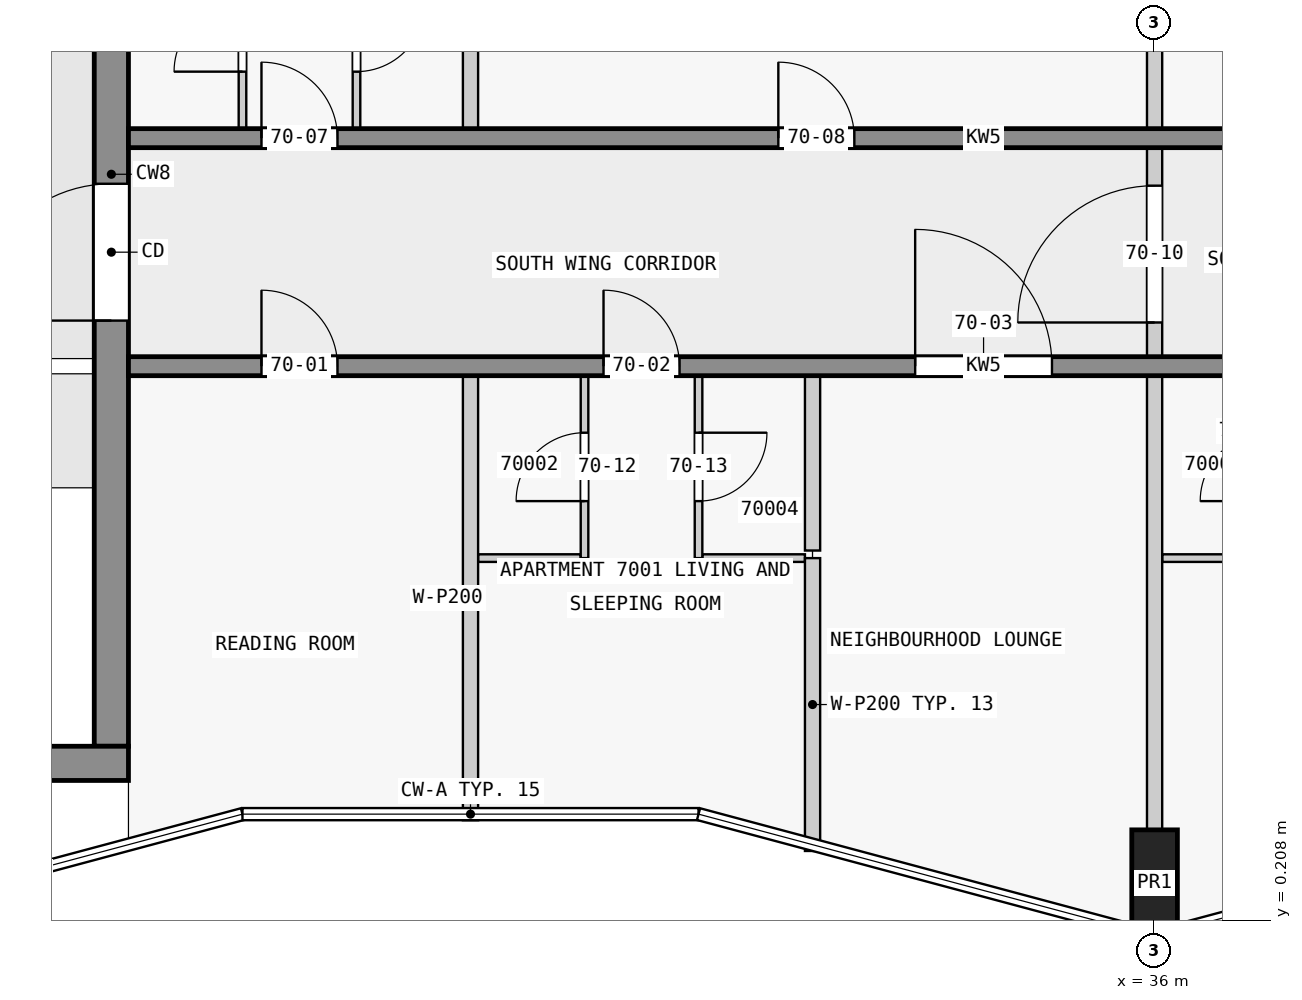
"""IFC4 building model, lengths in metres.
Left out: names, types, materials, properties, quantities, classifications, styles, units other than length and angle.
Written with IfcOpenShell. Run it as: python <this file> out.ifc"""

import sys

from ifc_helpers import new_model, si_unit, direction, frame, frame_2d, origin, origin_2d, place, context, subcontext, project, spatial, rectangle, extrude, element, fill, save


model = new_model("IFC4")
c1 = context("Model", 3, precision=1e-05, world=origin(), true_north=direction((0.0, 1.0)))
c2 = subcontext(c1, "Body", "Model", "MODEL_VIEW")
j1 = project(units=[si_unit("LENGTHUNIT", "METRE"), si_unit("PLANEANGLEUNIT", "RADIAN")], contexts=[c1])
p1 = place(None, origin())
s1 = spatial("IfcSite", under=j1, at=p1, CompositionType="ELEMENT")
p2 = place(p1, origin())
s2 = spatial("IfcBuilding", under=s1, at=p2, CompositionType="ELEMENT")
p3 = place(p2, frame((0.0, 0.0, 266.9)))
s3 = spatial("IfcBuildingStorey", under=s2, at=p3, CompositionType="ELEMENT", Elevation=266.9)
p4 = place(p3, frame((36.0, 0.7, 0.0), z_axis=(0.0, 0.0, 1.0), x_axis=(1.0, 0.0, 0.0)))
e1 = element("IfcColumn", 1, at=p4, inside=s3, PredefinedType="COLUMN", context=c2, shape_type="SweptSolid", body=[
    extrude(rectangle(XDim=0.6, YDim=1.4, at=origin_2d()), origin(), (0.0, 0.0, 1.0), 3.5),
])
p5 = place(p3, frame((1.85, 2.275, 0.0), z_axis=(0.0, 0.0, 1.0), x_axis=(1.0, 0.0, 0.0)))
e2 = element("IfcWall", 2, at=p5, inside=s3, PredefinedType="SHEAR", context=c2, shape_type="SweptSolid", body=[
    extrude(rectangle(XDim=20.65, YDim=0.45, at=frame_2d((10.325, 0.0))), origin(), (0.0, 0.0, 1.0), 3.25),
])
p6 = place(p3, frame((22.275, 2.5, 0.0), z_axis=(0.0, 0.0, 1.0), x_axis=(0.0, 1.0, 0.0)))
e3 = element("IfcWall", 3, at=p6, inside=s3, PredefinedType="SHEAR", context=c2, shape_type="SweptSolid", body=[
    extrude(rectangle(XDim=15.05, YDim=0.45, at=frame_2d((7.525, 0.0))), origin(), (0.0, 0.0, 1.0), 3.25),
])
p7 = place(p6, frame((5.6, 0.0, 0.0)))
e4 = element("IfcOpeningElement", 4, at=p7, cuts=e3, PredefinedType="OPENING", context=c2, shape_type="SweptSolid", body=[
    extrude(rectangle(XDim=1.8, YDim=2.1, at=frame_2d((0.9, 1.05))), frame((0.0, 0.235, 0.0), z_axis=(0.0, -1.0, 0.0), x_axis=(1.0, 0.0, 0.0)), (0.0, 0.0, 1.0), 0.47),
])
p8 = place(p3, frame((22.5, 7.5, 0.0), z_axis=(0.0, 0.0, 1.0), x_axis=(1.0, 0.0, 0.0)))
e5 = element("IfcWall", 5, at=p8, inside=s3, PredefinedType="SHEAR", context=c2, shape_type="SweptSolid", body=[
    extrude(rectangle(XDim=22.5, YDim=0.25, at=frame_2d((11.25, 0.0))), origin(), (0.0, 0.0, 1.0), 3.25),
])
p9 = place(p8, frame((1.75, 0.0, 0.0)))
e6 = element("IfcOpeningElement", 6, at=p9, cuts=e5, PredefinedType="OPENING", context=c2, shape_type="SweptSolid", body=[
    extrude(rectangle(XDim=1.0, YDim=2.1, at=frame_2d((0.5, 1.05))), frame((0.0, 0.135, 0.0), z_axis=(0.0, -1.0, 0.0), x_axis=(1.0, 0.0, 0.0)), (0.0, 0.0, 1.0), 0.27),
])
p10 = place(p8, frame((6.25, 0.0, 0.0)))
e7 = element("IfcOpeningElement", 7, at=p10, cuts=e5, PredefinedType="OPENING", context=c2, shape_type="SweptSolid", body=[
    extrude(rectangle(XDim=1.0, YDim=2.1, at=frame_2d((0.5, 1.05))), frame((0.0, 0.135, 0.0), z_axis=(0.0, -1.0, 0.0), x_axis=(1.0, 0.0, 0.0)), (0.0, 0.0, 1.0), 0.27),
])
p11 = place(p8, frame((10.35, 0.0, 0.0)))
e8 = element("IfcOpeningElement", 8, at=p11, cuts=e5, PredefinedType="OPENING", context=c2, shape_type="SweptSolid", body=[
    extrude(rectangle(XDim=1.8, YDim=2.1, at=frame_2d((0.9, 1.05))), frame((0.0, 0.135, 0.0), z_axis=(0.0, -1.0, 0.0), x_axis=(1.0, 0.0, 0.0)), (0.0, 0.0, 1.0), 0.27),
])
p12 = place(p8, frame((15.25, 0.0, 0.0)))
e9 = element("IfcOpeningElement", 9, at=p12, cuts=e5, PredefinedType="OPENING", context=c2, shape_type="SweptSolid", body=[
    extrude(rectangle(XDim=1.0, YDim=2.1, at=frame_2d((0.5, 1.05))), frame((0.0, 0.135, 0.0), z_axis=(0.0, -1.0, 0.0), x_axis=(1.0, 0.0, 0.0)), (0.0, 0.0, 1.0), 0.27),
])
p13 = place(p8, frame((18.75, 0.0, 0.0)))
e10 = element("IfcOpeningElement", 10, at=p13, cuts=e5, PredefinedType="OPENING", context=c2, shape_type="SweptSolid", body=[
    extrude(rectangle(XDim=0.9, YDim=2.1, at=frame_2d((0.45, 1.05))), frame((0.0, 0.135, 0.0), z_axis=(0.0, -1.0, 0.0), x_axis=(1.0, 0.0, 0.0)), (0.0, 0.0, 1.0), 0.27),
])
p14 = place(p8, frame((20.95, 0.0, 0.0)))
e11 = element("IfcOpeningElement", 11, at=p14, cuts=e5, PredefinedType="OPENING", context=c2, shape_type="SweptSolid", body=[
    extrude(rectangle(XDim=1.0, YDim=2.1, at=frame_2d((0.5, 1.05))), frame((0.0, 0.135, 0.0), z_axis=(0.0, -1.0, 0.0), x_axis=(1.0, 0.0, 0.0)), (0.0, 0.0, 1.0), 0.27),
])
p15 = place(p3, frame((22.5, 10.5, 0.0), z_axis=(0.0, 0.0, 1.0), x_axis=(1.0, 0.0, 0.0)))
e12 = element("IfcWall", 12, at=p15, inside=s3, PredefinedType="SHEAR", context=c2, shape_type="SweptSolid", body=[
    extrude(rectangle(XDim=22.5, YDim=0.25, at=frame_2d((11.25, 0.0))), origin(), (0.0, 0.0, 1.0), 3.25),
])
p16 = place(p15, frame((1.75, 0.0, 0.0)))
e13 = element("IfcOpeningElement", 13, at=p16, cuts=e12, PredefinedType="OPENING", context=c2, shape_type="SweptSolid", body=[
    extrude(rectangle(XDim=1.0, YDim=2.1, at=frame_2d((0.5, 1.05))), frame((0.0, 0.135, 0.0), z_axis=(0.0, -1.0, 0.0), x_axis=(1.0, 0.0, 0.0)), (0.0, 0.0, 1.0), 0.27),
])
p17 = place(p15, frame((8.55, 0.0, 0.0)))
e14 = element("IfcOpeningElement", 14, at=p17, cuts=e12, PredefinedType="OPENING", context=c2, shape_type="SweptSolid", body=[
    extrude(rectangle(XDim=1.0, YDim=2.1, at=frame_2d((0.5, 1.05))), frame((0.0, 0.135, 0.0), z_axis=(0.0, -1.0, 0.0), x_axis=(1.0, 0.0, 0.0)), (0.0, 0.0, 1.0), 0.27),
])
p18 = place(p15, frame((16.85, 0.0, 0.0)))
e15 = element("IfcOpeningElement", 15, at=p18, cuts=e12, PredefinedType="OPENING", context=c2, shape_type="SweptSolid", body=[
    extrude(rectangle(XDim=1.0, YDim=2.1, at=frame_2d((0.5, 1.05))), frame((0.0, 0.135, 0.0), z_axis=(0.0, -1.0, 0.0), x_axis=(1.0, 0.0, 0.0)), (0.0, 0.0, 1.0), 0.27),
])
for number, where, z_axis, x_axis in (
    (16, (27.1, 4.975, 0.0), (0.0, 0.0, 1.0), (1.0, 0.0, 0.0)),
    (17, (30.05, 4.975, 0.0), (0.0, 0.0, 1.0), (1.0, 0.0, 0.0)),
    (18, (36.1, 4.975, 0.0), (0.0, 0.0, 1.0), (1.0, 0.0, 0.0)),
):
    element("IfcWall", number, at=place(p3, frame(where, z_axis=z_axis, x_axis=x_axis)), inside=s3, PredefinedType="PARTITIONING", context=c2, shape_type="SweptSolid", body=[
        extrude(rectangle(XDim=1.35, YDim=0.1, at=frame_2d((0.675, 0.0))), origin(), (0.0, 0.0, 1.0), 3.25),
    ])
p19 = place(p3, frame((24.0, 10.625, 0.0), z_axis=(0.0, 0.0, 1.0), x_axis=(0.0, 1.0, 0.0)))
e19 = element("IfcWall", 19, at=p19, inside=s3, PredefinedType="PARTITIONING", context=c2, shape_type="SweptSolid", body=[
    extrude(rectangle(XDim=2.4, YDim=0.1, at=frame_2d((1.2, 0.0))), origin(), (0.0, 0.0, 1.0), 3.25),
])
p20 = place(p19, frame((0.75, 0.0, 0.0)))
e20 = element("IfcOpeningElement", 20, at=p20, cuts=e19, PredefinedType="OPENING", context=c2, shape_type="SweptSolid", body=[
    extrude(rectangle(XDim=0.9, YDim=2.1, at=frame_2d((0.45, 1.05))), frame((0.0, 0.06, 0.0), z_axis=(0.0, -1.0, 0.0), x_axis=(1.0, 0.0, 0.0)), (0.0, 0.0, 1.0), 0.12),
])
p21 = place(p3, frame((25.5, 13.025, 0.0), z_axis=(0.0, 0.0, 1.0), x_axis=(0.0, -1.0, 0.0)))
e21 = element("IfcWall", 21, at=p21, inside=s3, PredefinedType="PARTITIONING", context=c2, shape_type="SweptSolid", body=[
    extrude(rectangle(XDim=2.4, YDim=0.1, at=frame_2d((1.2, 0.0))), origin(), (0.0, 0.0, 1.0), 3.25),
])
p22 = place(p21, frame((0.75, 0.0, 0.0)))
e22 = element("IfcOpeningElement", 22, at=p22, cuts=e21, PredefinedType="OPENING", context=c2, shape_type="SweptSolid", body=[
    extrude(rectangle(XDim=0.9, YDim=2.1, at=frame_2d((0.45, 1.05))), frame((0.0, 0.06, 0.0), z_axis=(0.0, -1.0, 0.0), x_axis=(1.0, 0.0, 0.0)), (0.0, 0.0, 1.0), 0.12),
])
p23 = place(p3, frame((27.0, 1.527, 0.0), z_axis=(0.0, 0.0, 1.0), x_axis=(0.0, 1.0, 0.0)))
e23 = element("IfcWall", 23, at=p23, inside=s3, PredefinedType="PARTITIONING", context=c2, shape_type="SweptSolid", body=[
    extrude(rectangle(XDim=5.848, YDim=0.2, at=frame_2d((2.924, 0.0))), origin(), (0.0, 0.0, 1.0), 3.25),
])
p24 = place(p3, frame((27.0, 10.625, 0.0), z_axis=(0.0, 0.0, 1.0), x_axis=(0.0, 1.0, 0.0)))
e24 = element("IfcWall", 24, at=p24, inside=s3, PredefinedType="PARTITIONING", context=c2, shape_type="SweptSolid", body=[
    extrude(rectangle(XDim=2.3, YDim=0.2, at=frame_2d((1.15, 0.0))), origin(), (0.0, 0.0, 1.0), 3.25),
])
p25 = place(p3, frame((28.5, 4.975, 0.0), z_axis=(0.0, 0.0, 1.0), x_axis=(0.0, 1.0, 0.0)))
e25 = element("IfcWall", 25, at=p25, inside=s3, PredefinedType="PARTITIONING", context=c2, shape_type="SweptSolid", body=[
    extrude(rectangle(XDim=2.4, YDim=0.1, at=frame_2d((1.2, 0.0))), origin(), (0.0, 0.0, 1.0), 3.25),
])
p26 = place(p25, frame((0.75, 0.0, 0.0)))
e26 = element("IfcOpeningElement", 26, at=p26, cuts=e25, PredefinedType="OPENING", context=c2, shape_type="SweptSolid", body=[
    extrude(rectangle(XDim=0.9, YDim=2.1, at=frame_2d((0.45, 1.05))), frame((0.0, 0.06, 0.0), z_axis=(0.0, -1.0, 0.0), x_axis=(1.0, 0.0, 0.0)), (0.0, 0.0, 1.0), 0.12),
])
p27 = place(p3, frame((30.0, 7.375, 0.0), z_axis=(0.0, 0.0, 1.0), x_axis=(0.0, -1.0, 0.0)))
e27 = element("IfcWall", 27, at=p27, inside=s3, PredefinedType="PARTITIONING", context=c2, shape_type="SweptSolid", body=[
    extrude(rectangle(XDim=2.4, YDim=0.1, at=frame_2d((1.2, 0.0))), origin(), (0.0, 0.0, 1.0), 3.25),
])
p28 = place(p27, frame((0.75, 0.0, 0.0)))
e28 = element("IfcOpeningElement", 28, at=p28, cuts=e27, PredefinedType="OPENING", context=c2, shape_type="SweptSolid", body=[
    extrude(rectangle(XDim=0.9, YDim=2.1, at=frame_2d((0.45, 1.05))), frame((0.0, 0.06, 0.0), z_axis=(0.0, -1.0, 0.0), x_axis=(1.0, 0.0, 0.0)), (0.0, 0.0, 1.0), 0.12),
])
p29 = place(p3, frame((31.5, 4.975, 0.0), z_axis=(0.0, 0.0, 1.0), x_axis=(0.0, -1.0, 0.0)))
e29 = element("IfcWall", 29, at=p29, inside=s3, PredefinedType="PARTITIONING", context=c2, shape_type="SweptSolid", body=[
    extrude(rectangle(XDim=3.853, YDim=0.2, at=frame_2d((1.926, 0.0))), origin(), (0.0, 0.0, 1.0), 3.25),
])
p30 = place(p3, frame((31.5, 5.075, 0.0), z_axis=(0.0, 0.0, 1.0), x_axis=(0.0, 1.0, 0.0)))
e30 = element("IfcWall", 30, at=p30, inside=s3, PredefinedType="PARTITIONING", context=c2, shape_type="SweptSolid", body=[
    extrude(rectangle(XDim=2.3, YDim=0.2, at=frame_2d((1.15, 0.0))), origin(), (0.0, 0.0, 1.0), 3.25),
])
for number, where, z_axis, x_axis in (
    (31, (36.0, 1.4, 0.0), (0.0, 0.0, 1.0), (0.0, 1.0, 0.0)),
    (32, (36.0, 10.625, 0.0), (0.0, 0.0, 1.0), (0.0, 1.0, 0.0)),
):
    element("IfcWall", number, at=place(p3, frame(where, z_axis=z_axis, x_axis=x_axis)), inside=s3, PredefinedType="PARTITIONING", context=c2, shape_type="SweptSolid", body=[
        extrude(rectangle(XDim=5.975, YDim=0.2, at=frame_2d((2.988, 0.0))), origin(), (0.0, 0.0, 1.0), 3.25),
    ])
p31 = place(p3, frame((36.0, 7.475, 0.0), z_axis=(0.0, 0.0, 1.0), x_axis=(0.0, 1.0, 0.0)))
e33 = element("IfcWall", 33, at=p31, inside=s3, PredefinedType="PARTITIONING", context=c2, shape_type="SweptSolid", body=[
    extrude(rectangle(XDim=3.05, YDim=0.2, at=frame_2d((1.525, 0.0))), origin(), (0.0, 0.0, 1.0), 3.25),
])
p32 = place(p31, frame((0.6, 0.0, 0.0)))
e34 = element("IfcOpeningElement", 34, at=p32, cuts=e33, PredefinedType="OPENING", context=c2, shape_type="SweptSolid", body=[
    extrude(rectangle(XDim=1.8, YDim=2.1, at=frame_2d((0.9, 1.05))), frame((0.0, 0.11, 0.0), z_axis=(0.0, -1.0, 0.0), x_axis=(1.0, 0.0, 0.0)), (0.0, 0.0, 1.0), 0.22),
])
p33 = place(p7, origin())
e35 = element("IfcDoor", 35, at=p33, inside=s3, OperationType="DOUBLE_DOOR_SINGLE_SWING", PredefinedType="DOOR", context=c2, shape_type="SweptSolid", body=[
    extrude(rectangle(XDim=1.8, YDim=2.1, at=frame_2d((0.9, 1.05))), frame((0.0, 0.025, 0.0), z_axis=(0.0, -1.0, 0.0), x_axis=(1.0, 0.0, 0.0)), (0.0, 0.0, 1.0), 0.05),
])
fill(e4, e35)
p34 = place(p9, origin())
e36 = element("IfcDoor", 36, at=p34, inside=s3, OperationType="SINGLE_SWING_LEFT", PredefinedType="DOOR", context=c2, shape_type="SweptSolid", body=[
    extrude(rectangle(XDim=1.0, YDim=2.1, at=frame_2d((0.5, 1.05))), frame((0.0, 0.025, 0.0), z_axis=(0.0, -1.0, 0.0), x_axis=(1.0, 0.0, 0.0)), (0.0, 0.0, 1.0), 0.05),
])
fill(e6, e36)
p35 = place(p10, origin())
e37 = element("IfcDoor", 37, at=p35, inside=s3, OperationType="SINGLE_SWING_LEFT", PredefinedType="DOOR", context=c2, shape_type="SweptSolid", body=[
    extrude(rectangle(XDim=1.0, YDim=2.1, at=frame_2d((0.5, 1.05))), frame((0.0, 0.025, 0.0), z_axis=(0.0, -1.0, 0.0), x_axis=(1.0, 0.0, 0.0)), (0.0, 0.0, 1.0), 0.05),
])
fill(e7, e37)
p36 = place(p11, origin())
e38 = element("IfcDoor", 38, at=p36, inside=s3, OperationType="SINGLE_SWING_LEFT", PredefinedType="DOOR", context=c2, shape_type="SweptSolid", body=[
    extrude(rectangle(XDim=1.8, YDim=2.1, at=frame_2d((0.9, 1.05))), frame((0.0, 0.025, 0.0), z_axis=(0.0, -1.0, 0.0), x_axis=(1.0, 0.0, 0.0)), (0.0, 0.0, 1.0), 0.05),
])
fill(e8, e38)
p37 = place(p16, origin())
e39 = element("IfcDoor", 39, at=p37, inside=s3, OperationType="SINGLE_SWING_LEFT", PredefinedType="DOOR", context=c2, shape_type="SweptSolid", body=[
    extrude(rectangle(XDim=1.0, YDim=2.1, at=frame_2d((0.5, 1.05))), frame((0.0, 0.025, 0.0), z_axis=(0.0, -1.0, 0.0), x_axis=(1.0, 0.0, 0.0)), (0.0, 0.0, 1.0), 0.05),
])
fill(e13, e39)
p38 = place(p17, origin())
e40 = element("IfcDoor", 40, at=p38, inside=s3, OperationType="SINGLE_SWING_LEFT", PredefinedType="DOOR", context=c2, shape_type="SweptSolid", body=[
    extrude(rectangle(XDim=1.0, YDim=2.1, at=frame_2d((0.5, 1.05))), frame((0.0, 0.025, 0.0), z_axis=(0.0, -1.0, 0.0), x_axis=(1.0, 0.0, 0.0)), (0.0, 0.0, 1.0), 0.05),
])
fill(e14, e40)
p39 = place(p32, origin())
e41 = element("IfcDoor", 41, at=p39, inside=s3, OperationType="SINGLE_SWING_LEFT", PredefinedType="DOOR", context=c2, shape_type="SweptSolid", body=[
    extrude(rectangle(XDim=1.8, YDim=2.1, at=frame_2d((0.9, 1.05))), frame((0.0, 0.025, 0.0), z_axis=(0.0, -1.0, 0.0), x_axis=(1.0, 0.0, 0.0)), (0.0, 0.0, 1.0), 0.05),
])
fill(e34, e41)
p40 = place(p26, origin())
e42 = element("IfcDoor", 42, at=p40, inside=s3, OperationType="SINGLE_SWING_LEFT", PredefinedType="DOOR", context=c2, shape_type="SweptSolid", body=[
    extrude(rectangle(XDim=0.9, YDim=2.1, at=frame_2d((0.45, 1.05))), frame((0.0, 0.025, 0.0), z_axis=(0.0, -1.0, 0.0), x_axis=(1.0, 0.0, 0.0)), (0.0, 0.0, 1.0), 0.05),
])
fill(e26, e42)
p41 = place(p28, origin())
e43 = element("IfcDoor", 43, at=p41, inside=s3, OperationType="SINGLE_SWING_LEFT", PredefinedType="DOOR", context=c2, shape_type="SweptSolid", body=[
    extrude(rectangle(XDim=0.9, YDim=2.1, at=frame_2d((0.45, 1.05))), frame((0.0, 0.025, 0.0), z_axis=(0.0, -1.0, 0.0), x_axis=(1.0, 0.0, 0.0)), (0.0, 0.0, 1.0), 0.05),
])
fill(e28, e43)
p42 = place(p20, origin())
e44 = element("IfcDoor", 44, at=p42, inside=s3, OperationType="SINGLE_SWING_LEFT", PredefinedType="DOOR", context=c2, shape_type="SweptSolid", body=[
    extrude(rectangle(XDim=0.9, YDim=2.1, at=frame_2d((0.45, 1.05))), frame((0.0, 0.025, 0.0), z_axis=(0.0, -1.0, 0.0), x_axis=(1.0, 0.0, 0.0)), (0.0, 0.0, 1.0), 0.05),
])
fill(e20, e44)
p43 = place(p22, origin())
e45 = element("IfcDoor", 45, at=p43, inside=s3, OperationType="SINGLE_SWING_LEFT", PredefinedType="DOOR", context=c2, shape_type="SweptSolid", body=[
    extrude(rectangle(XDim=0.9, YDim=2.1, at=frame_2d((0.45, 1.05))), frame((0.0, 0.025, 0.0), z_axis=(0.0, -1.0, 0.0), x_axis=(1.0, 0.0, 0.0)), (0.0, 0.0, 1.0), 0.05),
])
fill(e22, e45)
save(model, sys.argv[1])
